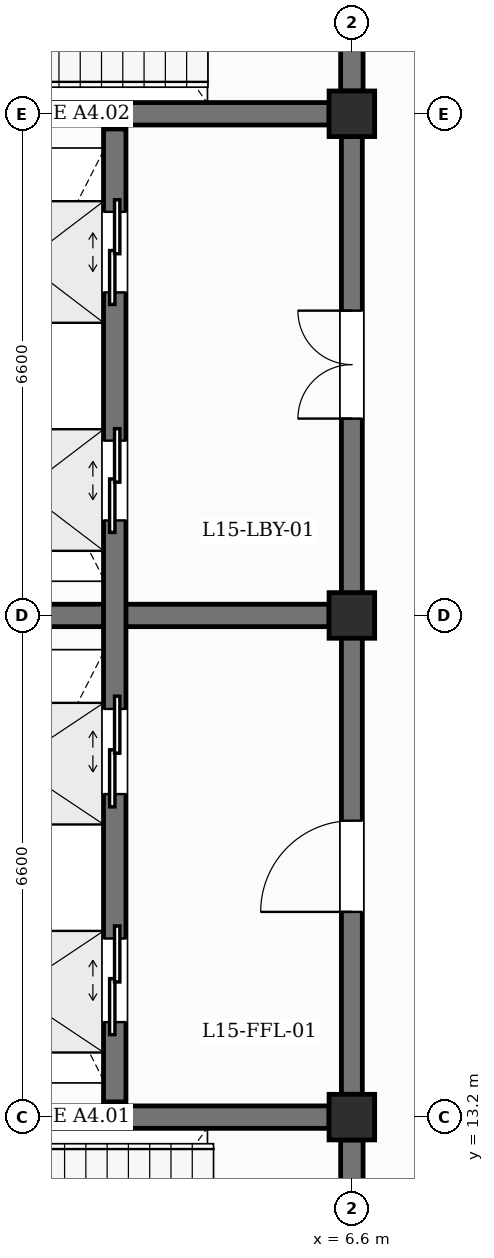
"""IFC4 building model, lengths in metres.
Left out: names, types, materials, properties, quantities, classifications, styles, units other than length and angle.
Written with IfcOpenShell. Run it as: python <this file> out.ifc"""

import sys

from ifc_helpers import new_model, si_unit, direction, frame, frame_2d, origin, origin_2d, place, context, subcontext, project, spatial, rectangle, extrude, element, fill, save


model = new_model("IFC4")
c1 = context("Model", 3, precision=1e-05, world=origin(), true_north=direction((0.0, 1.0)))
c2 = subcontext(c1, "Body", "Model", "MODEL_VIEW")
j1 = project(units=[si_unit("LENGTHUNIT", "METRE"), si_unit("PLANEANGLEUNIT", "RADIAN")], contexts=[c1])
p1 = place(None, origin())
s1 = spatial("IfcSite", under=j1, at=p1, CompositionType="ELEMENT")
p2 = place(p1, origin())
s2 = spatial("IfcBuilding", under=s1, at=p2, CompositionType="ELEMENT")
p3 = place(p2, frame((0.0, 0.0, 64.8)))
s3 = spatial("IfcBuildingStorey", under=s2, at=p3, CompositionType="ELEMENT", Elevation=64.8)
for number, where, z_axis, x_axis in (
    (1, (6.6, 13.2, 0.0), (0.0, 0.0, 1.0), (1.0, 0.0, 0.0)),
    (2, (6.6, 19.8, 0.0), (0.0, 0.0, 1.0), (1.0, 0.0, 0.0)),
    (3, (6.6, 26.4, 0.0), (0.0, 0.0, 1.0), (1.0, 0.0, 0.0)),
):
    element("IfcColumn", number, at=place(p3, frame(where, z_axis=z_axis, x_axis=x_axis)), inside=s3, PredefinedType="COLUMN", context=c2, shape_type="SweptSolid", body=[
        extrude(rectangle(XDim=0.6, YDim=0.6, at=origin_2d()), origin(), (0.0, 0.0, 1.0), 4.2),
    ])
p4 = place(p3, frame((0.3, 13.2, 0.0), z_axis=(0.0, 0.0, 1.0), x_axis=(1.0, 0.0, 0.0)))
e4 = element("IfcWall", 4, at=p4, inside=s3, PredefinedType="SHEAR", context=c2, shape_type="SweptSolid", body=[
    extrude(rectangle(XDim=6.0, YDim=0.295, at=frame_2d((3.0, 0.0))), origin(), (0.0, 0.0, 1.0), 3.3),
])
p5 = place(p3, frame((6.6, 6.9, 0.0), z_axis=(0.0, 0.0, 1.0), x_axis=(0.0, 1.0, 0.0)))
e5 = element("IfcWall", 5, at=p5, inside=s3, PredefinedType="SHEAR", context=c2, shape_type="SweptSolid", body=[
    extrude(rectangle(XDim=6.0, YDim=0.295, at=frame_2d((3.0, 0.0))), origin(), (0.0, 0.0, 1.0), 3.3),
])
p6 = place(p5, frame((2.45, 0.0, 0.0)))
e6 = element("IfcOpeningElement", 6, at=p6, cuts=e5, PredefinedType="OPENING", context=c2, shape_type="SweptSolid", body=[
    extrude(rectangle(XDim=1.1, YDim=2.15, at=frame_2d((0.55, 1.075))), frame((0.0, 0.157, 0.0), z_axis=(0.0, -1.0, 0.0), x_axis=(1.0, 0.0, 0.0)), (0.0, 0.0, 1.0), 0.315),
])
p7 = place(p3, frame((0.3, 26.4, 0.0), z_axis=(0.0, 0.0, 1.0), x_axis=(1.0, 0.0, 0.0)))
e7 = element("IfcWall", 7, at=p7, inside=s3, PredefinedType="SHEAR", context=c2, shape_type="SweptSolid", body=[
    extrude(rectangle(XDim=6.0, YDim=0.295, at=frame_2d((3.0, 0.0))), origin(), (0.0, 0.0, 1.0), 3.3),
])
p8 = place(p3, frame((6.6, 26.7, 0.0), z_axis=(0.0, 0.0, 1.0), x_axis=(0.0, 1.0, 0.0)))
e8 = element("IfcWall", 8, at=p8, inside=s3, PredefinedType="SHEAR", context=c2, shape_type="SweptSolid", body=[
    extrude(rectangle(XDim=6.0, YDim=0.295, at=frame_2d((3.0, 0.0))), origin(), (0.0, 0.0, 1.0), 3.3),
])
p9 = place(p8, frame((2.45, 0.0, 0.0)))
e9 = element("IfcOpeningElement", 9, at=p9, cuts=e8, PredefinedType="OPENING", context=c2, shape_type="SweptSolid", body=[
    extrude(rectangle(XDim=1.1, YDim=2.15, at=frame_2d((0.55, 1.075))), frame((0.0, 0.157, 0.0), z_axis=(0.0, -1.0, 0.0), x_axis=(1.0, 0.0, 0.0)), (0.0, 0.0, 1.0), 0.315),
])
p10 = place(p3, frame((0.3, 19.8, 0.0), z_axis=(0.0, 0.0, 1.0), x_axis=(1.0, 0.0, 0.0)))
e10 = element("IfcWall", 10, at=p10, inside=s3, PredefinedType="SHEAR", context=c2, shape_type="SweptSolid", body=[
    extrude(rectangle(XDim=6.0, YDim=0.295, at=frame_2d((3.0, 0.0))), origin(), (0.0, 0.0, 1.0), 3.3),
])
p11 = place(p3, frame((6.6, 13.5, 0.0), z_axis=(0.0, 0.0, 1.0), x_axis=(0.0, 1.0, 0.0)))
e11 = element("IfcWall", 11, at=p11, inside=s3, PredefinedType="SHEAR", context=c2, shape_type="SweptSolid", body=[
    extrude(rectangle(XDim=6.0, YDim=0.275, at=frame_2d((3.0, 0.0))), origin(), (0.0, 0.0, 1.0), 3.3),
])
p12 = place(p11, frame((2.4, 0.0, 0.0)))
e12 = element("IfcOpeningElement", 12, at=p12, cuts=e11, PredefinedType="OPENING", context=c2, shape_type="SweptSolid", body=[
    extrude(rectangle(XDim=1.2, YDim=2.25, at=frame_2d((0.6, 1.125))), frame((0.0, 0.147, 0.0), z_axis=(0.0, -1.0, 0.0), x_axis=(1.0, 0.0, 0.0)), (0.0, 0.0, 1.0), 0.295),
])
p13 = place(p3, frame((6.6, 20.1, 0.0), z_axis=(0.0, 0.0, 1.0), x_axis=(0.0, 1.0, 0.0)))
e13 = element("IfcWall", 13, at=p13, inside=s3, PredefinedType="SHEAR", context=c2, shape_type="SweptSolid", body=[
    extrude(rectangle(XDim=6.0, YDim=0.275, at=frame_2d((3.0, 0.0))), origin(), (0.0, 0.0, 1.0), 3.3),
])
p14 = place(p13, frame((2.29, 0.0, 0.0)))
e14 = element("IfcOpeningElement", 14, at=p14, cuts=e13, PredefinedType="OPENING", context=c2, shape_type="SweptSolid", body=[
    extrude(rectangle(XDim=1.42, YDim=2.2, at=frame_2d((0.71, 1.1))), frame((0.0, 0.147, 0.0), z_axis=(0.0, -1.0, 0.0), x_axis=(1.0, 0.0, 0.0)), (0.0, 0.0, 1.0), 0.295),
])
p15 = place(p3, frame((3.48, 13.4, 0.0), z_axis=(0.0, 0.0, 1.0), x_axis=(0.0, 1.0, 0.0)))
e15 = element("IfcWall", 15, at=p15, inside=s3, PredefinedType="SHEAR", context=c2, shape_type="SweptSolid", body=[
    extrude(rectangle(XDim=6.2, YDim=0.295, at=frame_2d((3.1, 0.0))), origin(), (0.0, 0.0, 1.0), 3.9),
])
p16 = place(p15, frame((1.05, 0.0, 0.0)))
e16 = element("IfcOpeningElement", 16, at=p16, cuts=e15, PredefinedType="OPENING", context=c2, shape_type="SweptSolid", body=[
    extrude(rectangle(XDim=1.1, YDim=2.15, at=frame_2d((0.55, 1.075))), frame((0.0, 0.157, 0.0), z_axis=(0.0, -1.0, 0.0), x_axis=(1.0, 0.0, 0.0)), (0.0, 0.0, 1.0), 0.315),
])
p17 = place(p15, frame((4.05, 0.0, 0.0)))
e17 = element("IfcOpeningElement", 17, at=p17, cuts=e15, PredefinedType="OPENING", context=c2, shape_type="SweptSolid", body=[
    extrude(rectangle(XDim=1.12, YDim=2.15, at=frame_2d((0.56, 1.075))), frame((0.0, 0.157, 0.0), z_axis=(0.0, -1.0, 0.0), x_axis=(1.0, 0.0, 0.0)), (0.0, 0.0, 1.0), 0.315),
])
p18 = place(p3, frame((3.48, 20.0, 0.0), z_axis=(0.0, 0.0, 1.0), x_axis=(0.0, 1.0, 0.0)))
e18 = element("IfcWall", 18, at=p18, inside=s3, PredefinedType="SHEAR", context=c2, shape_type="SweptSolid", body=[
    extrude(rectangle(XDim=6.2, YDim=0.295, at=frame_2d((3.1, 0.0))), origin(), (0.0, 0.0, 1.0), 3.9),
])
p19 = place(p18, frame((1.05, 0.0, 0.0)))
e19 = element("IfcOpeningElement", 19, at=p19, cuts=e18, PredefinedType="OPENING", context=c2, shape_type="SweptSolid", body=[
    extrude(rectangle(XDim=1.05, YDim=2.15, at=frame_2d((0.525, 1.075))), frame((0.0, 0.157, 0.0), z_axis=(0.0, -1.0, 0.0), x_axis=(1.0, 0.0, 0.0)), (0.0, 0.0, 1.0), 0.315),
])
p20 = place(p18, frame((4.05, 0.0, 0.0)))
e20 = element("IfcOpeningElement", 20, at=p20, cuts=e18, PredefinedType="OPENING", context=c2, shape_type="SweptSolid", body=[
    extrude(rectangle(XDim=1.06, YDim=2.15, at=frame_2d((0.53, 1.075))), frame((0.0, 0.157, 0.0), z_axis=(0.0, -1.0, 0.0), x_axis=(1.0, 0.0, 0.0)), (0.0, 0.0, 1.0), 0.315),
])
p21 = place(p16, origin())
e21 = element("IfcDoor", 21, at=p21, inside=s3, OperationType="DOUBLE_DOOR_SLIDING", PredefinedType="USERDEFINED", context=c2, shape_type="SweptSolid", body=[
    extrude(rectangle(XDim=1.1, YDim=2.15, at=frame_2d((0.55, 1.075))), frame((0.0, 0.025, 0.0), z_axis=(0.0, -1.0, 0.0), x_axis=(1.0, 0.0, 0.0)), (0.0, 0.0, 1.0), 0.05),
])
fill(e16, e21)
p22 = place(p17, origin())
e22 = element("IfcDoor", 22, at=p22, inside=s3, OperationType="DOUBLE_DOOR_SLIDING", PredefinedType="USERDEFINED", context=c2, shape_type="SweptSolid", body=[
    extrude(rectangle(XDim=1.12, YDim=2.15, at=frame_2d((0.56, 1.075))), frame((0.0, 0.025, 0.0), z_axis=(0.0, -1.0, 0.0), x_axis=(1.0, 0.0, 0.0)), (0.0, 0.0, 1.0), 0.05),
])
fill(e17, e22)
p23 = place(p19, origin())
e23 = element("IfcDoor", 23, at=p23, inside=s3, OperationType="DOUBLE_DOOR_SLIDING", PredefinedType="USERDEFINED", context=c2, shape_type="SweptSolid", body=[
    extrude(rectangle(XDim=1.05, YDim=2.15, at=frame_2d((0.525, 1.075))), frame((0.0, 0.025, 0.0), z_axis=(0.0, -1.0, 0.0), x_axis=(1.0, 0.0, 0.0)), (0.0, 0.0, 1.0), 0.05),
])
fill(e19, e23)
p24 = place(p20, origin())
e24 = element("IfcDoor", 24, at=p24, inside=s3, OperationType="DOUBLE_DOOR_SLIDING", PredefinedType="USERDEFINED", context=c2, shape_type="SweptSolid", body=[
    extrude(rectangle(XDim=1.06, YDim=2.15, at=frame_2d((0.53, 1.075))), frame((0.0, 0.025, 0.0), z_axis=(0.0, -1.0, 0.0), x_axis=(1.0, 0.0, 0.0)), (0.0, 0.0, 1.0), 0.05),
])
fill(e20, e24)
p25 = place(p12, origin())
e25 = element("IfcDoor", 25, at=p25, inside=s3, OperationType="SINGLE_SWING_LEFT", PredefinedType="DOOR", context=c2, shape_type="SweptSolid", body=[
    extrude(rectangle(XDim=1.2, YDim=2.25, at=frame_2d((0.6, 1.125))), frame((0.0, 0.025, 0.0), z_axis=(0.0, -1.0, 0.0), x_axis=(1.0, 0.0, 0.0)), (0.0, 0.0, 1.0), 0.05),
])
fill(e12, e25)
p26 = place(p14, origin())
e26 = element("IfcDoor", 26, at=p26, inside=s3, OperationType="DOUBLE_DOOR_SINGLE_SWING", PredefinedType="DOOR", context=c2, shape_type="SweptSolid", body=[
    extrude(rectangle(XDim=1.42, YDim=2.2, at=frame_2d((0.71, 1.1))), frame((0.0, 0.025, 0.0), z_axis=(0.0, -1.0, 0.0), x_axis=(1.0, 0.0, 0.0)), (0.0, 0.0, 1.0), 0.05),
])
fill(e14, e26)
save(model, sys.argv[1])
